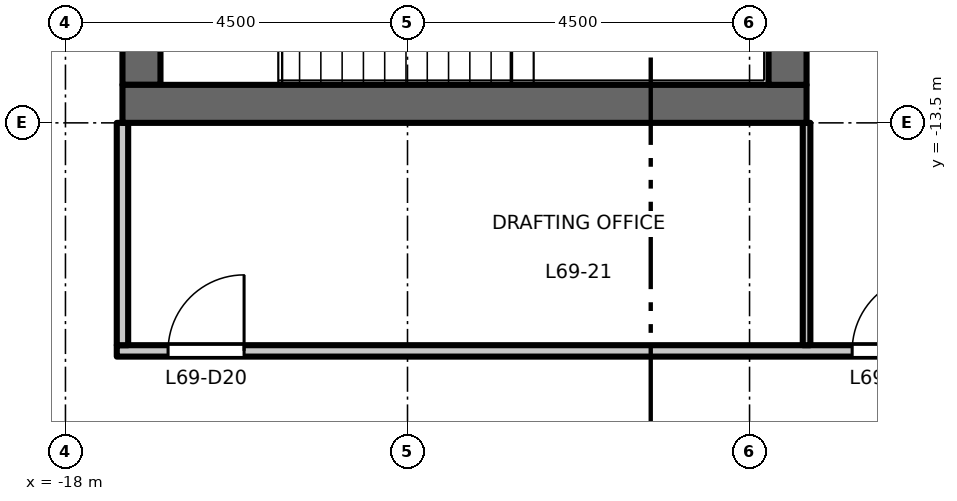
"""IFC4 building model, lengths in metres.
Left out: names, types, materials, properties, quantities, classifications, styles, units other than length and angle.
Written with IfcOpenShell. Run it as: python <this file> out.ifc"""

import sys

from ifc_helpers import new_model, si_unit, direction, frame, frame_2d, origin, place, context, subcontext, project, spatial, rectangle, extrude, element, fill, save


model = new_model("IFC4")
c1 = context("Model", 3, precision=1e-05, world=origin(), true_north=direction((0.0, 1.0)))
c2 = subcontext(c1, "Body", "Model", "MODEL_VIEW")
j1 = project(units=[si_unit("LENGTHUNIT", "METRE"), si_unit("PLANEANGLEUNIT", "RADIAN")], contexts=[c1])
p1 = place(None, origin())
s1 = spatial("IfcSite", under=j1, at=p1, CompositionType="ELEMENT")
p2 = place(p1, origin())
s2 = spatial("IfcBuilding", under=s1, at=p2, CompositionType="ELEMENT")
p3 = place(p2, frame((0.0, 0.0, 321.2)))
s3 = spatial("IfcBuildingStorey", under=s2, at=p3, CompositionType="ELEMENT", Elevation=321.2)
p4 = place(p3, frame((-17.0, -13.0, 0.0), z_axis=(0.0, 0.0, 1.0), x_axis=(0.0, 1.0, 0.0)))
e1 = element("IfcWall", 1, at=p4, inside=s3, PredefinedType="SHEAR", context=c2, shape_type="SweptSolid", body=[
    extrude(rectangle(XDim=26.0, YDim=0.5, at=frame_2d((13.0, 0.0))), origin(), (0.0, 0.0, 1.0), 4.35),
])
p5 = place(p4, frame((16.825, 0.0, 0.0)))
e2 = element("IfcOpeningElement", 2, at=p5, cuts=e1, PredefinedType="OPENING", context=c2, shape_type="SweptSolid", body=[
    extrude(rectangle(XDim=1.8, YDim=2.1, at=frame_2d((0.9, 1.05))), frame((0.0, 0.26, 0.0), z_axis=(0.0, -1.0, 0.0), x_axis=(1.0, 0.0, 0.0)), (0.0, 0.0, 1.0), 0.52),
])
p6 = place(p4, frame((7.375, 0.0, 0.0)))
e3 = element("IfcOpeningElement", 3, at=p6, cuts=e1, PredefinedType="OPENING", context=c2, shape_type="SweptSolid", body=[
    extrude(rectangle(XDim=1.8, YDim=2.1, at=frame_2d((0.9, 1.05))), frame((0.0, 0.26, 0.0), z_axis=(0.0, -1.0, 0.0), x_axis=(1.0, 0.0, 0.0)), (0.0, 0.0, 1.0), 0.52),
])
p7 = place(p3, frame((-8.25, -13.25, 0.0), z_axis=(0.0, 0.0, 1.0), x_axis=(-1.0, 0.0, 0.0)))
e4 = element("IfcWall", 4, at=p7, inside=s3, PredefinedType="SHEAR", context=c2, shape_type="SweptSolid", body=[
    extrude(rectangle(XDim=9.0, YDim=0.5, at=frame_2d((4.5, 0.0))), origin(), (0.0, 0.0, 1.0), 4.35),
])
p8 = place(p3, frame((-8.5, -13.0, 0.0), z_axis=(0.0, 0.0, 1.0), x_axis=(0.0, 1.0, 0.0)))
e5 = element("IfcWall", 5, at=p8, inside=s3, PredefinedType="SHEAR", context=c2, shape_type="SweptSolid", body=[
    extrude(rectangle(XDim=26.0, YDim=0.5, at=frame_2d((13.0, 0.0))), origin(), (0.0, 0.0, 1.0), 4.35),
])
p9 = place(p3, frame((-17.325, -16.5, 0.0), z_axis=(0.0, 0.0, 1.0), x_axis=(1.0, 0.0, 0.0)))
e6 = element("IfcWall", 6, at=p9, inside=s3, PredefinedType="PARTITIONING", context=c2, shape_type="SweptSolid", body=[
    extrude(rectangle(XDim=34.65, YDim=0.15, at=frame_2d((17.325, 0.0))), origin(), (0.0, 0.0, 1.0), 4.35),
])
p10 = place(p9, frame((9.675, 0.0, 0.0)))
e7 = element("IfcOpeningElement", 7, at=p10, cuts=e6, PredefinedType="OPENING", context=c2, shape_type="SweptSolid", body=[
    extrude(rectangle(XDim=1.0, YDim=2.1, at=frame_2d((0.5, 1.05))), frame((0.0, 0.085, 0.0), z_axis=(0.0, -1.0, 0.0), x_axis=(1.0, 0.0, 0.0)), (0.0, 0.0, 1.0), 0.17),
])
p11 = place(p9, frame((23.925, 0.0, 0.0)))
e8 = element("IfcOpeningElement", 8, at=p11, cuts=e6, PredefinedType="OPENING", context=c2, shape_type="SweptSolid", body=[
    extrude(rectangle(XDim=1.0, YDim=2.1, at=frame_2d((0.5, 1.05))), frame((0.0, 0.085, 0.0), z_axis=(0.0, -1.0, 0.0), x_axis=(1.0, 0.0, 0.0)), (0.0, 0.0, 1.0), 0.17),
])
p12 = place(p9, frame((0.675, 0.0, 0.0)))
e9 = element("IfcOpeningElement", 9, at=p12, cuts=e6, PredefinedType="OPENING", context=c2, shape_type="SweptSolid", body=[
    extrude(rectangle(XDim=1.0, YDim=2.1, at=frame_2d((0.5, 1.05))), frame((0.0, 0.085, 0.0), z_axis=(0.0, -1.0, 0.0), x_axis=(1.0, 0.0, 0.0)), (0.0, 0.0, 1.0), 0.17),
])
p13 = place(p9, frame((32.925, 0.0, 0.0)))
e10 = element("IfcOpeningElement", 10, at=p13, cuts=e6, PredefinedType="OPENING", context=c2, shape_type="SweptSolid", body=[
    extrude(rectangle(XDim=1.0, YDim=2.1, at=frame_2d((0.5, 1.05))), frame((0.0, 0.085, 0.0), z_axis=(0.0, -1.0, 0.0), x_axis=(1.0, 0.0, 0.0)), (0.0, 0.0, 1.0), 0.17),
])
p14 = place(p3, frame((-17.25, -16.425, 0.0), z_axis=(0.0, 0.0, 1.0), x_axis=(0.0, 1.0, 0.0)))
e11 = element("IfcWall", 11, at=p14, inside=s3, PredefinedType="PARTITIONING", context=c2, shape_type="SweptSolid", body=[
    extrude(rectangle(XDim=2.925, YDim=0.15, at=frame_2d((1.462, 0.0))), origin(), (0.0, 0.0, 1.0), 4.35),
])
p15 = place(p3, frame((-8.25, -16.425, 0.0), z_axis=(0.0, 0.0, 1.0), x_axis=(0.0, 1.0, 0.0)))
e12 = element("IfcWall", 12, at=p15, inside=s3, PredefinedType="PARTITIONING", context=c2, shape_type="SweptSolid", body=[
    extrude(rectangle(XDim=2.925, YDim=0.1, at=frame_2d((1.462, 0.0))), origin(), (0.0, 0.0, 1.0), 4.35),
])
p16 = place(p10, origin())
e13 = element("IfcDoor", 13, at=p16, inside=s3, OperationType="SINGLE_SWING_RIGHT", PredefinedType="DOOR", context=c2, shape_type="SweptSolid", body=[
    extrude(rectangle(XDim=1.0, YDim=2.1, at=frame_2d((0.5, 1.05))), frame((0.0, 0.025, 0.0), z_axis=(0.0, -1.0, 0.0), x_axis=(1.0, 0.0, 0.0)), (0.0, 0.0, 1.0), 0.05),
])
fill(e7, e13)
p17 = place(p12, origin())
e14 = element("IfcDoor", 14, at=p17, inside=s3, OperationType="SINGLE_SWING_RIGHT", PredefinedType="DOOR", context=c2, shape_type="SweptSolid", body=[
    extrude(rectangle(XDim=1.0, YDim=2.1, at=frame_2d((0.5, 1.05))), frame((0.0, 0.025, 0.0), z_axis=(0.0, -1.0, 0.0), x_axis=(1.0, 0.0, 0.0)), (0.0, 0.0, 1.0), 0.05),
])
fill(e9, e14)
save(model, sys.argv[1])
